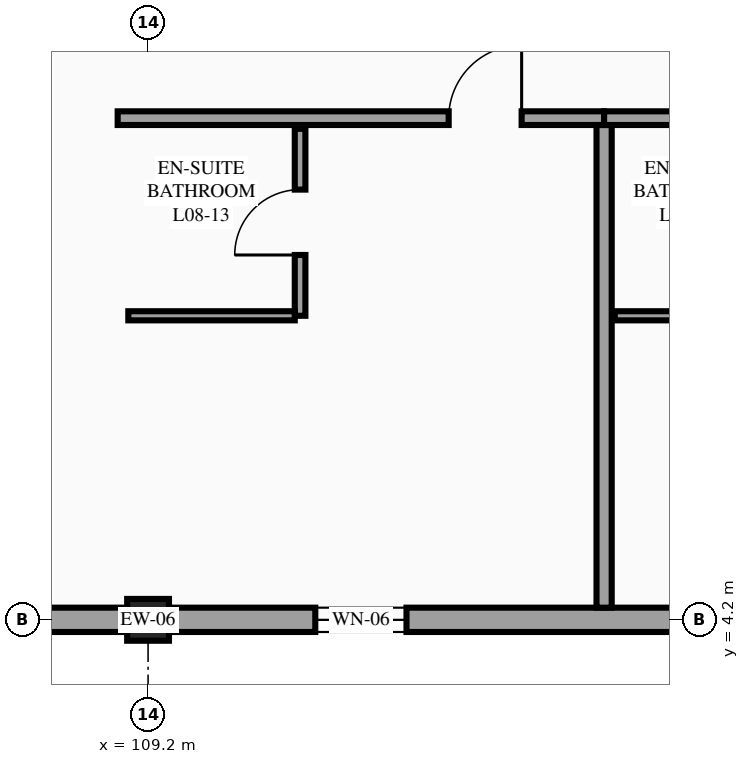
"""IFC4 building model, lengths in metres.
Left out: names, types, materials, properties, quantities, classifications, styles, units other than length and angle.
Written with IfcOpenShell. Run it as: python <this file> out.ifc"""

import sys

from ifc_helpers import new_model, si_unit, direction, frame, frame_2d, origin, origin_2d, place, context, subcontext, project, spatial, rectangle, extrude, element, fill, save


model = new_model("IFC4")
c1 = context("Model", 3, precision=1e-05, world=origin(), true_north=direction((0.0, 1.0)))
c2 = subcontext(c1, "Body", "Model", "MODEL_VIEW")
j1 = project(units=[si_unit("LENGTHUNIT", "METRE"), si_unit("PLANEANGLEUNIT", "RADIAN")], contexts=[c1])
p1 = place(None, origin())
s1 = spatial("IfcSite", under=j1, at=p1, CompositionType="ELEMENT")
p2 = place(p1, origin())
s2 = spatial("IfcBuilding", under=s1, at=p2, CompositionType="ELEMENT")
p3 = place(p2, frame((0.0, 0.0, 32.7)))
s3 = spatial("IfcBuildingStorey", under=s2, at=p3, CompositionType="ELEMENT", Elevation=32.7)
p4 = place(p3, frame((109.2, 4.2, 0.0), z_axis=(0.0, 0.0, 1.0), x_axis=(1.0, 0.0, 0.0)))
e1 = element("IfcColumn", 1, at=p4, inside=s3, PredefinedType="COLUMN", context=c2, shape_type="SweptSolid", body=[
    extrude(rectangle(XDim=0.55, YDim=0.55, at=origin_2d()), origin(), (0.0, 0.0, 1.0), 3.6),
])
p5 = place(p3, frame((100.8, 4.2, 0.0), z_axis=(0.0, 0.0, 1.0), x_axis=(1.0, 0.0, 0.0)))
e2 = element("IfcWall", 2, at=p5, inside=s3, PredefinedType="STANDARD", context=c2, shape_type="SweptSolid", body=[
    extrude(rectangle(XDim=16.8, YDim=0.32, at=frame_2d((8.4, 0.0))), origin(), (0.0, 0.0, 1.0), 2.63),
])
p6 = place(p5, frame((10.6, 0.0, 0.85)))
e3 = element("IfcOpeningElement", 3, at=p6, cuts=e2, PredefinedType="OPENING", context=c2, shape_type="SweptSolid", body=[
    extrude(rectangle(XDim=1.2, YDim=1.5, at=frame_2d((0.6, 0.75))), frame((0.0, 0.17, 0.0), z_axis=(0.0, -1.0, 0.0), x_axis=(1.0, 0.0, 0.0)), (0.0, 0.0, 1.0), 0.34),
])
p7 = place(p3, frame((108.8, 10.8, 0.0), z_axis=(0.0, 0.0, 1.0), x_axis=(1.0, 0.0, 0.0)))
e4 = element("IfcWall", 4, at=p7, inside=s3, PredefinedType="PARTITIONING", context=c2, shape_type="SweptSolid", body=[
    extrude(rectangle(XDim=6.4, YDim=0.18, at=frame_2d((3.2, 0.0))), origin(), (0.0, 0.0, 1.0), 3.375),
])
p8 = place(p7, frame((4.355, 0.0, 0.0)))
e5 = element("IfcOpeningElement", 5, at=p8, cuts=e4, PredefinedType="OPENING", context=c2, shape_type="SweptSolid", body=[
    extrude(rectangle(XDim=0.96, YDim=2.15, at=frame_2d((0.48, 1.075))), frame((0.0, 0.1, 0.0), z_axis=(0.0, -1.0, 0.0), x_axis=(1.0, 0.0, 0.0)), (0.0, 0.0, 1.0), 0.2),
])
p9 = place(p3, frame((115.2, 4.36, 0.0), z_axis=(0.0, 0.0, 1.0), x_axis=(0.0, 1.0, 0.0)))
e6 = element("IfcWall", 6, at=p9, inside=s3, PredefinedType="PARTITIONING", context=c2, shape_type="SweptSolid", body=[
    extrude(rectangle(XDim=6.35, YDim=0.2, at=frame_2d((3.175, 0.0))), origin(), (0.0, 0.0, 1.0), 3.375),
])
p10 = place(p3, frame((111.2, 8.2, 0.0), z_axis=(0.0, 0.0, 1.0), x_axis=(0.0, 1.0, 0.0)))
e7 = element("IfcWall", 7, at=p10, inside=s3, PredefinedType="PARTITIONING", context=c2, shape_type="SweptSolid", body=[
    extrude(rectangle(XDim=2.46, YDim=0.14, at=frame_2d((1.23, 0.0))), origin(), (0.0, 0.0, 1.0), 3.375),
])
p11 = place(p10, frame((0.8, 0.0, 0.0)))
e8 = element("IfcOpeningElement", 8, at=p11, cuts=e7, PredefinedType="OPENING", context=c2, shape_type="SweptSolid", body=[
    extrude(rectangle(XDim=0.86, YDim=2.1, at=frame_2d((0.43, 1.05))), frame((0.0, 0.08, 0.0), z_axis=(0.0, -1.0, 0.0), x_axis=(1.0, 0.0, 0.0)), (0.0, 0.0, 1.0), 0.16),
])
p12 = place(p3, frame((108.94, 8.2, 0.0), z_axis=(0.0, 0.0, 1.0), x_axis=(1.0, 0.0, 0.0)))
e9 = element("IfcWall", 9, at=p12, inside=s3, PredefinedType="PARTITIONING", context=c2, shape_type="SweptSolid", body=[
    extrude(rectangle(XDim=2.19, YDim=0.12, at=frame_2d((1.095, 0.0))), origin(), (0.0, 0.0, 1.0), 3.375),
])
p13 = place(p3, frame((115.2, 10.8, 0.0), z_axis=(0.0, 0.0, 1.0), x_axis=(1.0, 0.0, 0.0)))
e10 = element("IfcWall", 10, at=p13, inside=s3, PredefinedType="PARTITIONING", context=c2, shape_type="SweptSolid", body=[
    extrude(rectangle(XDim=6.4, YDim=0.18, at=frame_2d((3.2, 0.0))), origin(), (0.0, 0.0, 1.0), 3.375),
])
p14 = place(p13, frame((4.355, 0.0, 0.0)))
e11 = element("IfcOpeningElement", 11, at=p14, cuts=e10, PredefinedType="OPENING", context=c2, shape_type="SweptSolid", body=[
    extrude(rectangle(XDim=0.96, YDim=2.15, at=frame_2d((0.48, 1.075))), frame((0.0, 0.1, 0.0), z_axis=(0.0, -1.0, 0.0), x_axis=(1.0, 0.0, 0.0)), (0.0, 0.0, 1.0), 0.2),
])
p15 = place(p3, frame((115.34, 8.2, 0.0), z_axis=(0.0, 0.0, 1.0), x_axis=(1.0, 0.0, 0.0)))
e12 = element("IfcWall", 12, at=p15, inside=s3, PredefinedType="PARTITIONING", context=c2, shape_type="SweptSolid", body=[
    extrude(rectangle(XDim=2.19, YDim=0.12, at=frame_2d((1.095, 0.0))), origin(), (0.0, 0.0, 1.0), 3.375),
])
p16 = place(p6, origin())
e13 = element("IfcWindow", 13, at=p16, inside=s3, PartitioningType="SINGLE_PANEL", PredefinedType="WINDOW", context=c2, shape_type="SweptSolid", body=[
    extrude(rectangle(XDim=1.2, YDim=1.5, at=frame_2d((0.6, 0.75))), frame((0.0, 0.03, 0.0), z_axis=(0.0, -1.0, 0.0), x_axis=(1.0, 0.0, 0.0)), (0.0, 0.0, 1.0), 0.06),
])
fill(e3, e13)
p17 = place(p8, origin())
e14 = element("IfcDoor", 14, at=p17, inside=s3, OperationType="SINGLE_SWING_RIGHT", PredefinedType="DOOR", context=c2, shape_type="SweptSolid", body=[
    extrude(rectangle(XDim=0.96, YDim=2.15, at=frame_2d((0.48, 1.075))), frame((0.0, 0.025, 0.0), z_axis=(0.0, -1.0, 0.0), x_axis=(1.0, 0.0, 0.0)), (0.0, 0.0, 1.0), 0.05),
])
fill(e5, e14)
p18 = place(p11, origin())
e15 = element("IfcDoor", 15, at=p18, inside=s3, OperationType="SINGLE_SWING_LEFT", PredefinedType="DOOR", context=c2, shape_type="SweptSolid", body=[
    extrude(rectangle(XDim=0.86, YDim=2.1, at=frame_2d((0.43, 1.05))), frame((0.0, 0.025, 0.0), z_axis=(0.0, -1.0, 0.0), x_axis=(1.0, 0.0, 0.0)), (0.0, 0.0, 1.0), 0.05),
])
fill(e8, e15)
save(model, sys.argv[1])
